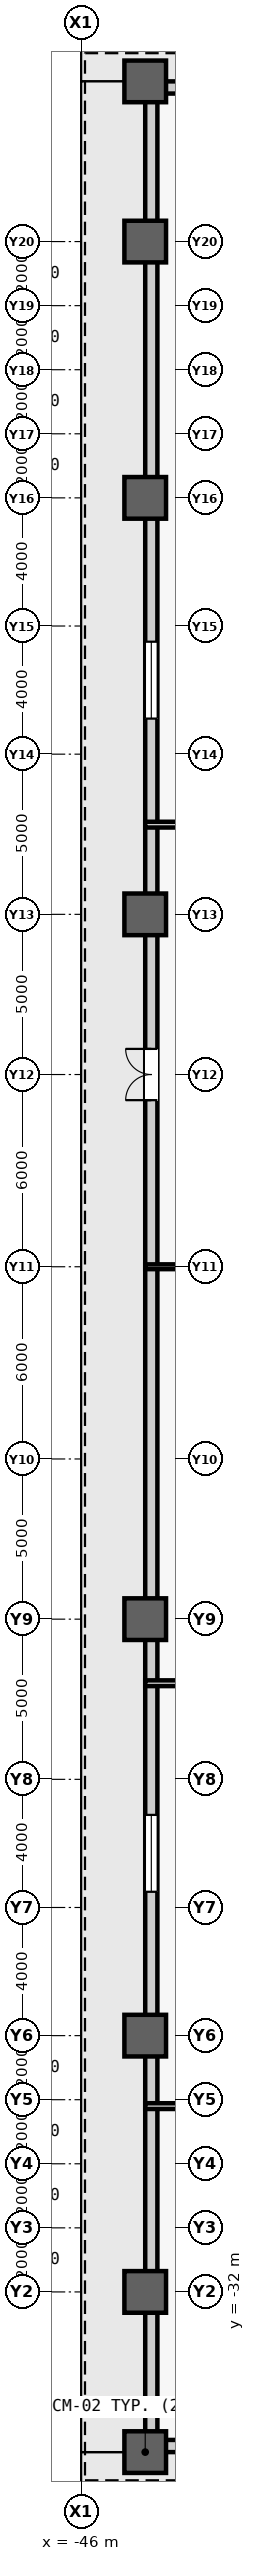
"""IFC4 building model, lengths in metres.
Left out: names, types, materials, properties, quantities, classifications, styles, units other than length and angle.
Written with IfcOpenShell. Run it as: python <this file> out.ifc"""

import sys

from ifc_helpers import new_model, si_unit, direction, frame, frame_2d, origin, origin_2d, place, context, subcontext, project, spatial, rectangle, extrude, source, transform, mapped, element, fill, save


model = new_model("IFC4")
c1 = context("Model", 3, precision=1e-05, world=origin(), true_north=direction((0.0, 1.0)))
c2 = subcontext(c1, "Body", "Model", "MODEL_VIEW")
j1 = project(units=[si_unit("LENGTHUNIT", "METRE"), si_unit("PLANEANGLEUNIT", "RADIAN")], contexts=[c1])
p1 = place(None, origin())
s1 = spatial("IfcSite", under=j1, at=p1, CompositionType="ELEMENT")
p2 = place(p1, origin())
s2 = spatial("IfcBuilding", under=s1, at=p2, CompositionType="ELEMENT")
p3 = place(p2, frame((0.0, 0.0, 6.6)))
s3 = spatial("IfcBuildingStorey", under=s2, at=p3, CompositionType="ELEMENT", Elevation=6.6)
m1 = source(origin(), c2, "Body", "SweptSolid", [
    extrude(rectangle(XDim=1.3, YDim=1.3, at=origin_2d()), origin(), (0.0, 0.0, 1.0), 5.4),
])
for number, where, z_axis, x_axis in (
    (1, (-44.0, -37.0, 0.0), (0.0, 0.0, 1.0), (1.0, 0.0, 0.0)),
    (2, (-44.0, -24.0, 0.0), (0.0, 0.0, 1.0), (1.0, 0.0, 0.0)),
    (3, (-44.0, -11.0, 0.0), (0.0, 0.0, 1.0), (1.0, 0.0, 0.0)),
    (4, (-44.0, 11.0, 0.0), (0.0, 0.0, 1.0), (1.0, 0.0, 0.0)),
    (5, (-44.0, 24.0, 0.0), (0.0, 0.0, 1.0), (1.0, 0.0, 0.0)),
    (6, (-44.0, 37.0, 0.0), (0.0, 0.0, 1.0), (1.0, 0.0, 0.0)),
    (7, (-44.0, -32.0, 0.0), (0.0, 0.0, 1.0), (1.0, 0.0, 0.0)),
    (8, (-44.0, 32.0, 0.0), (0.0, 0.0, 1.0), (1.0, 0.0, 0.0)),
):
    element("IfcColumn", number, at=place(p3, frame(where, z_axis=z_axis, x_axis=x_axis)), inside=s3, PredefinedType="COLUMN", context=c2, shape_type="MappedRepresentation", body=[
        mapped(m1, transform((0.0, 0.0, 0.0), scale=1.0)),
    ])
m2 = source(origin(), c2, "Body", "SweptSolid", [
    extrude(rectangle(XDim=34.0, YDim=0.38, at=frame_2d((17.0, 0.0))), origin(), (0.0, 0.0, 1.0), 3.28),
])
p4 = place(p3, frame((-44.0, -36.81, 0.0), z_axis=(0.0, 0.0, 1.0), x_axis=(1.0, 0.0, 0.0)))
e9 = element("IfcWall", 9, at=p4, inside=s3, PredefinedType="STANDARD", context=c2, shape_type="MappedRepresentation", body=[
    mapped(m2, transform((0.0, 0.0, 0.0), scale=1.0)),
])
m3 = source(origin(), c2, "Body", "SweptSolid", [
    extrude(rectangle(XDim=1.6, YDim=2.25, at=frame_2d((0.8, 1.125))), frame((0.0, 0.2, 0.0), z_axis=(0.0, -1.0, 0.0), x_axis=(1.0, 0.0, 0.0)), (0.0, 0.0, 1.0), 0.4),
])
p5 = place(p4, frame((16.2, 0.0, 0.0)))
e10 = element("IfcOpeningElement", 10, at=p5, cuts=e9, PredefinedType="OPENING", context=c2, shape_type="MappedRepresentation", body=[
    mapped(m3, transform((0.0, 0.0, 0.0), scale=1.0)),
])
m4 = source(origin(), c2, "Body", "SweptSolid", [
    extrude(rectangle(XDim=2.4, YDim=2.56, at=frame_2d((1.2, 1.28))), frame((0.0, 0.2, 0.0), z_axis=(0.0, -1.0, 0.0), x_axis=(1.0, 0.0, 0.0)), (0.0, 0.0, 1.0), 0.4),
])
p6 = place(p4, frame((7.3, 0.0, 0.5)))
e11 = element("IfcOpeningElement", 11, at=p6, cuts=e9, PredefinedType="OPENING", context=c2, shape_type="MappedRepresentation", body=[
    mapped(m4, transform((0.0, 0.0, 0.0), scale=1.0)),
])
p7 = place(p3, frame((-44.0, 36.81, 0.0), z_axis=(0.0, 0.0, 1.0), x_axis=(1.0, 0.0, 0.0)))
e12 = element("IfcWall", 12, at=p7, inside=s3, PredefinedType="STANDARD", context=c2, shape_type="MappedRepresentation", body=[
    mapped(m2, transform((0.0, 0.0, 0.0), scale=1.0)),
])
p8 = place(p7, frame((16.2, 0.0, 0.0)))
e13 = element("IfcOpeningElement", 13, at=p8, cuts=e12, PredefinedType="OPENING", context=c2, shape_type="MappedRepresentation", body=[
    mapped(m3, transform((0.0, 0.0, 0.0), scale=1.0)),
])
p9 = place(p7, frame((7.3, 0.0, 0.5)))
e14 = element("IfcOpeningElement", 14, at=p9, cuts=e12, PredefinedType="OPENING", context=c2, shape_type="MappedRepresentation", body=[
    mapped(m4, transform((0.0, 0.0, 0.0), scale=1.0)),
])
p10 = place(p7, frame((24.3, 0.0, 0.5)))
e15 = element("IfcOpeningElement", 15, at=p10, cuts=e12, PredefinedType="OPENING", context=c2, shape_type="MappedRepresentation", body=[
    mapped(m4, transform((0.0, 0.0, 0.0), scale=1.0)),
])
m5 = source(origin(), c2, "Body", "SweptSolid", [
    extrude(rectangle(XDim=73.24, YDim=0.38, at=frame_2d((36.62, 0.0))), origin(), (0.0, 0.0, 1.0), 3.28),
])
p11 = place(p3, frame((-43.81, -36.62, 0.0), z_axis=(0.0, 0.0, 1.0), x_axis=(0.0, 1.0, 0.0)))
e16 = element("IfcWall", 16, at=p11, inside=s3, PredefinedType="STANDARD", context=c2, shape_type="MappedRepresentation", body=[
    mapped(m5, transform((0.0, 0.0, 0.0), scale=1.0)),
])
p12 = place(p11, frame((41.82, 0.0, 0.0)))
e17 = element("IfcOpeningElement", 17, at=p12, cuts=e16, PredefinedType="OPENING", context=c2, shape_type="MappedRepresentation", body=[
    mapped(m3, transform((0.0, 0.0, 0.0), scale=1.0)),
])
p13 = place(p11, frame((17.11, 0.0, 0.5)))
e18 = element("IfcOpeningElement", 18, at=p13, cuts=e16, PredefinedType="OPENING", context=c2, shape_type="MappedRepresentation", body=[
    mapped(m4, transform((0.0, 0.0, 0.0), scale=1.0)),
])
p14 = place(p11, frame((53.73, 0.0, 0.5)))
e19 = element("IfcOpeningElement", 19, at=p14, cuts=e16, PredefinedType="OPENING", context=c2, shape_type="MappedRepresentation", body=[
    mapped(m4, transform((0.0, 0.0, 0.0), scale=1.0)),
])
m6 = source(origin(), c2, "Body", "SweptSolid", [
    extrude(rectangle(XDim=88.0, YDim=0.18, at=frame_2d((44.0, 0.0))), origin(), (0.0, 0.0, 1.0), 5.08),
])
p15 = place(p3, frame((-44.0, -26.2, 0.0), z_axis=(0.0, 0.0, 1.0), x_axis=(1.0, 0.0, 0.0)))
e20 = element("IfcWall", 20, at=p15, inside=s3, PredefinedType="PARTITIONING", context=c2, shape_type="MappedRepresentation", body=[
    mapped(m6, transform((0.0, 0.0, 0.0), scale=1.0)),
])
m7 = source(origin(), c2, "Body", "SweptSolid", [
    extrude(rectangle(XDim=1.05, YDim=2.2, at=frame_2d((0.525, 1.1))), frame((0.0, 0.1, 0.0), z_axis=(0.0, -1.0, 0.0), x_axis=(1.0, 0.0, 0.0)), (0.0, 0.0, 1.0), 0.2),
])
p16 = place(p15, frame((18.725, 0.0, 0.0)))
e21 = element("IfcOpeningElement", 21, at=p16, cuts=e20, PredefinedType="OPENING", context=c2, shape_type="MappedRepresentation", body=[
    mapped(m7, transform((0.0, 0.0, 0.0), scale=1.0)),
])
p17 = place(p15, frame((35.475, 0.0, 0.0)))
e22 = element("IfcOpeningElement", 22, at=p17, cuts=e20, PredefinedType="OPENING", context=c2, shape_type="MappedRepresentation", body=[
    mapped(m7, transform((0.0, 0.0, 0.0), scale=1.0)),
])
p18 = place(p15, frame((60.225, 0.0, 0.0)))
e23 = element("IfcOpeningElement", 23, at=p18, cuts=e20, PredefinedType="OPENING", context=c2, shape_type="MappedRepresentation", body=[
    mapped(m7, transform((0.0, 0.0, 0.0), scale=1.0)),
])
p19 = place(p3, frame((-44.0, 13.8, 0.0), z_axis=(0.0, 0.0, 1.0), x_axis=(1.0, 0.0, 0.0)))
e24 = element("IfcWall", 24, at=p19, inside=s3, PredefinedType="PARTITIONING", context=c2, shape_type="MappedRepresentation", body=[
    mapped(m6, transform((0.0, 0.0, 0.0), scale=1.0)),
])
p20 = place(p19, frame((22.725, 0.0, 0.0)))
e25 = element("IfcOpeningElement", 25, at=p20, cuts=e24, PredefinedType="OPENING", context=c2, shape_type="MappedRepresentation", body=[
    mapped(m7, transform((0.0, 0.0, 0.0), scale=1.0)),
])
p21 = place(p19, frame((44.475, 0.0, 0.0)))
e26 = element("IfcOpeningElement", 26, at=p21, cuts=e24, PredefinedType="OPENING", context=c2, shape_type="MappedRepresentation", body=[
    mapped(m7, transform((0.0, 0.0, 0.0), scale=1.0)),
])
p22 = place(p19, frame((65.225, 0.0, 0.0)))
e27 = element("IfcOpeningElement", 27, at=p22, cuts=e24, PredefinedType="OPENING", context=c2, shape_type="MappedRepresentation", body=[
    mapped(m7, transform((0.0, 0.0, 0.0), scale=1.0)),
])
m8 = source(origin(), c2, "Body", "SweptSolid", [
    extrude(rectangle(XDim=25.8, YDim=0.18, at=frame_2d((12.9, 0.0))), origin(), (0.0, 0.0, 1.0), 5.08),
])
p23 = place(p3, frame((-44.0, -13.0, 0.0), z_axis=(0.0, 0.0, 1.0), x_axis=(1.0, 0.0, 0.0)))
e28 = element("IfcWall", 28, at=p23, inside=s3, PredefinedType="PARTITIONING", context=c2, shape_type="MappedRepresentation", body=[
    mapped(m8, transform((0.0, 0.0, 0.0), scale=1.0)),
])
m9 = source(origin(), c2, "Body", "SweptSolid", [
    extrude(rectangle(XDim=25.8, YDim=0.15, at=frame_2d((12.9, 0.0))), origin(), (0.0, 0.0, 1.0), 3.28),
])
p24 = place(p3, frame((-44.0, 0.0, 0.0), z_axis=(0.0, 0.0, 1.0), x_axis=(1.0, 0.0, 0.0)))
e29 = element("IfcWall", 29, at=p24, inside=s3, PredefinedType="PARTITIONING", context=c2, shape_type="MappedRepresentation", body=[
    mapped(m9, transform((0.0, 0.0, 0.0), scale=1.0)),
])
m10 = source(origin(), c2, "Body", "SweptSolid", [
    extrude(rectangle(XDim=1.6, YDim=2.25, at=frame_2d((0.8, 1.125))), frame((0.0, 0.025, 0.0), z_axis=(0.0, -1.0, 0.0), x_axis=(1.0, 0.0, 0.0)), (0.0, 0.0, 1.0), 0.05),
])
p25 = place(p12, origin())
e30 = element("IfcDoor", 30, at=p25, inside=s3, OperationType="DOUBLE_DOOR_SINGLE_SWING", PredefinedType="DOOR", context=c2, shape_type="MappedRepresentation", body=[
    mapped(m10, transform((0.0, 0.0, 0.0), scale=1.0)),
])
fill(e17, e30)
m11 = source(origin(), c2, "Body", "SweptSolid", [
    extrude(rectangle(XDim=2.4, YDim=2.56, at=frame_2d((1.2, 1.28))), frame((0.0, 0.03, 0.0), z_axis=(0.0, -1.0, 0.0), x_axis=(1.0, 0.0, 0.0)), (0.0, 0.0, 1.0), 0.06),
])
p26 = place(p13, origin())
e31 = element("IfcWindow", 31, at=p26, inside=s3, PartitioningType="SINGLE_PANEL", PredefinedType="WINDOW", context=c2, shape_type="MappedRepresentation", body=[
    mapped(m11, transform((0.0, 0.0, 0.0), scale=1.0)),
])
fill(e18, e31)
p27 = place(p14, origin())
e32 = element("IfcWindow", 32, at=p27, inside=s3, PartitioningType="SINGLE_PANEL", PredefinedType="WINDOW", context=c2, shape_type="MappedRepresentation", body=[
    mapped(m11, transform((0.0, 0.0, 0.0), scale=1.0)),
])
fill(e19, e32)
save(model, sys.argv[1])
